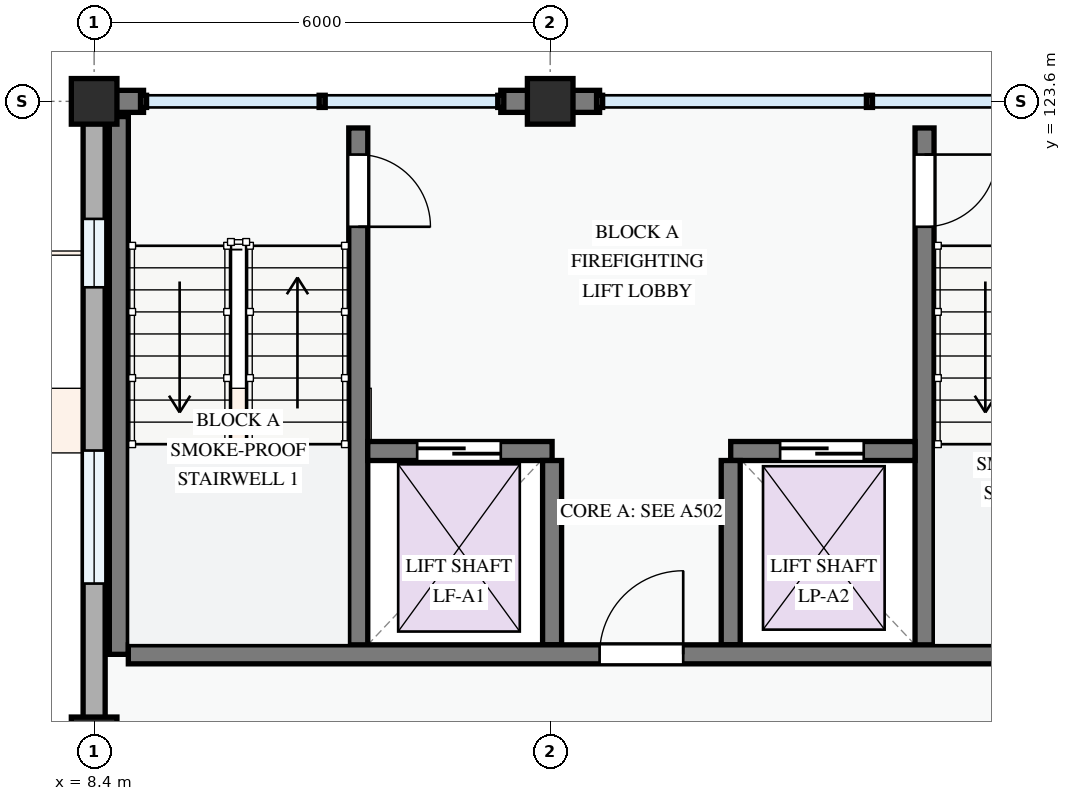
"""IFC4 building model, lengths in metres.
Left out: names, types, materials, properties, quantities, classifications, styles, units other than length and angle.
Written with IfcOpenShell. Run it as: python <this file> out.ifc"""

import sys

from ifc_helpers import new_model, si_unit, direction, frame, frame_2d, origin, origin_2d, place, context, subcontext, project, spatial, rectangle, extrude, element, fill, save


model = new_model("IFC4")
c1 = context("Model", 3, precision=1e-05, world=origin(), true_north=direction((0.0, 1.0)))
c2 = subcontext(c1, "Body", "Model", "MODEL_VIEW")
j1 = project(units=[si_unit("LENGTHUNIT", "METRE"), si_unit("PLANEANGLEUNIT", "RADIAN")], contexts=[c1])
p1 = place(None, origin())
s1 = spatial("IfcSite", under=j1, at=p1, CompositionType="ELEMENT")
p2 = place(p1, origin())
s2 = spatial("IfcBuilding", under=s1, at=p2, CompositionType="ELEMENT")
p3 = place(p2, frame((0.0, 0.0, 27.9)))
s3 = spatial("IfcBuildingStorey", under=s2, at=p3, CompositionType="ELEMENT", Elevation=27.9)
for number, where, z_axis, x_axis in (
    (1, (8.4, 115.2, 0.0), (0.0, 0.0, 1.0), (1.0, 0.0, 0.0)),
    (2, (8.4, 123.6, 0.0), (0.0, 0.0, 1.0), (1.0, 0.0, 0.0)),
    (3, (14.4, 123.6, 0.0), (0.0, 0.0, 1.0), (1.0, 0.0, 0.0)),
):
    element("IfcColumn", number, at=place(p3, frame(where, z_axis=z_axis, x_axis=x_axis)), inside=s3, PredefinedType="COLUMN", context=c2, shape_type="SweptSolid", body=[
        extrude(rectangle(XDim=0.6, YDim=0.6, at=origin_2d()), origin(), (0.0, 0.0, 1.0), 3.3),
    ])
p4 = place(p3, frame((15.05, 123.6, 0.0), z_axis=(0.0, 0.0, 1.0), x_axis=(-1.0, 0.0, 0.0)))
e4 = element("IfcWall", 4, at=p4, inside=s3, PredefinedType="STANDARD", context=c2, shape_type="SweptSolid", body=[
    extrude(rectangle(XDim=0.65, YDim=0.29, at=frame_2d((0.325, 0.0))), origin(), (0.0, 0.0, 1.0), 3.04),
])
p5 = place(p3, frame((14.4, 123.6, 0.0), z_axis=(0.0, 0.0, 1.0), x_axis=(-1.0, 0.0, 0.0)))
e5 = element("IfcWall", 5, at=p5, inside=s3, PredefinedType="STANDARD", context=c2, shape_type="SweptSolid", body=[
    extrude(rectangle(XDim=0.65, YDim=0.29, at=frame_2d((0.325, 0.0))), origin(), (0.0, 0.0, 1.0), 3.04),
])
p6 = place(p3, frame((9.05, 123.6, 0.0), z_axis=(0.0, 0.0, 1.0), x_axis=(-1.0, 0.0, 0.0)))
e6 = element("IfcWall", 6, at=p6, inside=s3, PredefinedType="STANDARD", context=c2, shape_type="SweptSolid", body=[
    extrude(rectangle(XDim=0.503, YDim=0.29, at=frame_2d((0.251, 0.0))), origin(), (0.0, 0.0, 1.0), 3.04),
])
p7 = place(p3, frame((8.4, 123.6, 0.0), z_axis=(0.0, 0.0, 1.0), x_axis=(0.0, -1.0, 0.0)))
e7 = element("IfcWall", 7, at=p7, inside=s3, PredefinedType="STANDARD", context=c2, shape_type="SweptSolid", body=[
    extrude(rectangle(XDim=8.4, YDim=0.29, at=frame_2d((4.2, 0.0))), origin(), (0.0, 0.0, 1.0), 2.345),
])
p8 = place(p7, frame((1.546, 0.0, 0.78)))
e8 = element("IfcOpeningElement", 8, at=p8, cuts=e7, PredefinedType="OPENING", context=c2, shape_type="SweptSolid", body=[
    extrude(rectangle(XDim=0.9, YDim=1.2, at=frame_2d((0.45, 0.6))), frame((0.0, 0.155, 0.0), z_axis=(0.0, -1.0, 0.0), x_axis=(1.0, 0.0, 0.0)), (0.0, 0.0, 1.0), 0.31),
])
p9 = place(p7, frame((4.594, 0.0, 0.78)))
e9 = element("IfcOpeningElement", 9, at=p9, cuts=e7, PredefinedType="OPENING", context=c2, shape_type="SweptSolid", body=[
    extrude(rectangle(XDim=1.75, YDim=1.45, at=frame_2d((0.875, 0.725))), frame((0.0, 0.155, 0.0), z_axis=(0.0, -1.0, 0.0), x_axis=(1.0, 0.0, 0.0)), (0.0, 0.0, 1.0), 0.31),
])
p10 = place(p3, frame((11.875, 123.25, 0.0), z_axis=(0.0, 0.0, 1.0), x_axis=(0.0, -1.0, 0.0)))
e10 = element("IfcWall", 10, at=p10, inside=s3, PredefinedType="SHEAR", context=c2, shape_type="SweptSolid", body=[
    extrude(rectangle(XDim=6.925, YDim=0.25, at=frame_2d((3.462, 0.0))), origin(), (0.0, 0.0, 1.0), 3.0),
])
p11 = place(p10, frame((0.35, 0.0, 0.0)))
e11 = element("IfcOpeningElement", 11, at=p11, cuts=e10, PredefinedType="OPENING", context=c2, shape_type="SweptSolid", body=[
    extrude(rectangle(XDim=0.95, YDim=2.1, at=frame_2d((0.475, 1.05))), frame((0.0, 0.135, 0.0), z_axis=(0.0, -1.0, 0.0), x_axis=(1.0, 0.0, 0.0)), (0.0, 0.0, 1.0), 0.27),
])
p12 = place(p3, frame((8.725, 123.4, 0.0), z_axis=(0.0, 0.0, 1.0), x_axis=(0.0, -1.0, 0.0)))
e12 = element("IfcWall", 12, at=p12, inside=s3, PredefinedType="SHEAR", context=c2, shape_type="SweptSolid", body=[
    extrude(rectangle(XDim=7.075, YDim=0.25, at=frame_2d((3.538, 0.0))), origin(), (0.0, 0.0, 1.0), 3.0),
])
p13 = place(p3, frame((19.325, 123.25, 0.0), z_axis=(0.0, 0.0, 1.0), x_axis=(0.0, -1.0, 0.0)))
e13 = element("IfcWall", 13, at=p13, inside=s3, PredefinedType="SHEAR", context=c2, shape_type="SweptSolid", body=[
    extrude(rectangle(XDim=6.925, YDim=0.25, at=frame_2d((3.462, 0.0))), origin(), (0.0, 0.0, 1.0), 3.0),
])
p14 = place(p13, frame((0.35, 0.0, 0.0)))
e14 = element("IfcOpeningElement", 14, at=p14, cuts=e13, PredefinedType="OPENING", context=c2, shape_type="SweptSolid", body=[
    extrude(rectangle(XDim=0.95, YDim=2.1, at=frame_2d((0.475, 1.05))), frame((0.0, 0.135, 0.0), z_axis=(0.0, -1.0, 0.0), x_axis=(1.0, 0.0, 0.0)), (0.0, 0.0, 1.0), 0.27),
])
p15 = place(p3, frame((12.0, 119.0, 0.0), z_axis=(0.0, 0.0, 1.0), x_axis=(1.0, 0.0, 0.0)))
e15 = element("IfcWall", 15, at=p15, inside=s3, PredefinedType="SHEAR", context=c2, shape_type="SweptSolid", body=[
    extrude(rectangle(XDim=2.425, YDim=0.25, at=frame_2d((1.212, 0.0))), origin(), (0.0, 0.0, 1.0), 3.0),
])
p16 = place(p15, frame((0.65, 0.0, 0.0)))
e16 = element("IfcOpeningElement", 16, at=p16, cuts=e15, PredefinedType="OPENING", context=c2, shape_type="SweptSolid", body=[
    extrude(rectangle(XDim=1.1, YDim=2.15, at=frame_2d((0.55, 1.075))), frame((0.0, 0.135, 0.0), z_axis=(0.0, -1.0, 0.0), x_axis=(1.0, 0.0, 0.0)), (0.0, 0.0, 1.0), 0.27),
])
p17 = place(p3, frame((16.775, 119.0, 0.0), z_axis=(0.0, 0.0, 1.0), x_axis=(1.0, 0.0, 0.0)))
e17 = element("IfcWall", 17, at=p17, inside=s3, PredefinedType="SHEAR", context=c2, shape_type="SweptSolid", body=[
    extrude(rectangle(XDim=2.425, YDim=0.25, at=frame_2d((1.212, 0.0))), origin(), (0.0, 0.0, 1.0), 3.0),
])
p18 = place(p17, frame((0.65, 0.0, 0.0)))
e18 = element("IfcOpeningElement", 18, at=p18, cuts=e17, PredefinedType="OPENING", context=c2, shape_type="SweptSolid", body=[
    extrude(rectangle(XDim=1.1, YDim=2.15, at=frame_2d((0.55, 1.075))), frame((0.0, 0.135, 0.0), z_axis=(0.0, -1.0, 0.0), x_axis=(1.0, 0.0, 0.0)), (0.0, 0.0, 1.0), 0.27),
])
for number, where, z_axis, x_axis in (
    (19, (14.425, 118.875, 0.0), (0.0, 0.0, 1.0), (0.0, -1.0, 0.0)),
    (20, (16.775, 118.875, 0.0), (0.0, 0.0, 1.0), (0.0, -1.0, 0.0)),
):
    element("IfcWall", number, at=place(p3, frame(where, z_axis=z_axis, x_axis=x_axis)), inside=s3, PredefinedType="SHEAR", context=c2, shape_type="SweptSolid", body=[
        extrude(rectangle(XDim=2.425, YDim=0.25, at=frame_2d((1.212, 0.0))), origin(), (0.0, 0.0, 1.0), 3.0),
    ])
p19 = place(p3, frame((8.85, 116.325, 0.0), z_axis=(0.0, 0.0, 1.0), x_axis=(1.0, 0.0, 0.0)))
e21 = element("IfcWall", 21, at=p19, inside=s3, PredefinedType="SHEAR", context=c2, shape_type="SweptSolid", body=[
    extrude(rectangle(XDim=13.5, YDim=0.25, at=frame_2d((6.75, 0.0))), origin(), (0.0, 0.0, 1.0), 3.0),
])
p20 = place(p19, frame((6.2, 0.0, 0.0)))
e22 = element("IfcOpeningElement", 22, at=p20, cuts=e21, PredefinedType="OPENING", context=c2, shape_type="SweptSolid", body=[
    extrude(rectangle(XDim=1.1, YDim=2.15, at=frame_2d((0.55, 1.075))), frame((0.0, 0.135, 0.0), z_axis=(0.0, -1.0, 0.0), x_axis=(1.0, 0.0, 0.0)), (0.0, 0.0, 1.0), 0.27),
])
p21 = place(p8, origin())
e23 = element("IfcWindow", 23, at=p21, inside=s3, PartitioningType="SINGLE_PANEL", PredefinedType="WINDOW", context=c2, shape_type="SweptSolid", body=[
    extrude(rectangle(XDim=0.9, YDim=1.2, at=frame_2d((0.45, 0.6))), frame((0.0, 0.03, 0.0), z_axis=(0.0, -1.0, 0.0), x_axis=(1.0, 0.0, 0.0)), (0.0, 0.0, 1.0), 0.06),
])
fill(e8, e23)
p22 = place(p9, origin())
e24 = element("IfcWindow", 24, at=p22, inside=s3, PartitioningType="DOUBLE_PANEL_VERTICAL", PredefinedType="WINDOW", context=c2, shape_type="SweptSolid", body=[
    extrude(rectangle(XDim=1.75, YDim=1.45, at=frame_2d((0.875, 0.725))), frame((0.0, 0.03, 0.0), z_axis=(0.0, -1.0, 0.0), x_axis=(1.0, 0.0, 0.0)), (0.0, 0.0, 1.0), 0.06),
])
fill(e9, e24)
p23 = place(p11, origin())
e25 = element("IfcDoor", 25, at=p23, inside=s3, OperationType="SINGLE_SWING_RIGHT", PredefinedType="DOOR", context=c2, shape_type="SweptSolid", body=[
    extrude(rectangle(XDim=0.95, YDim=2.1, at=frame_2d((0.475, 1.05))), frame((0.0, 0.025, 0.0), z_axis=(0.0, -1.0, 0.0), x_axis=(1.0, 0.0, 0.0)), (0.0, 0.0, 1.0), 0.05),
])
fill(e11, e25)
p24 = place(p14, origin())
e26 = element("IfcDoor", 26, at=p24, inside=s3, OperationType="SINGLE_SWING_LEFT", PredefinedType="DOOR", context=c2, shape_type="SweptSolid", body=[
    extrude(rectangle(XDim=0.95, YDim=2.1, at=frame_2d((0.475, 1.05))), frame((0.0, 0.025, 0.0), z_axis=(0.0, -1.0, 0.0), x_axis=(1.0, 0.0, 0.0)), (0.0, 0.0, 1.0), 0.05),
])
fill(e14, e26)
p25 = place(p16, origin())
e27 = element("IfcDoor", 27, at=p25, inside=s3, OperationType="SLIDING_TO_LEFT", PredefinedType="DOOR", context=c2, shape_type="SweptSolid", body=[
    extrude(rectangle(XDim=1.1, YDim=2.15, at=frame_2d((0.55, 1.075))), frame((0.0, 0.025, 0.0), z_axis=(0.0, -1.0, 0.0), x_axis=(1.0, 0.0, 0.0)), (0.0, 0.0, 1.0), 0.05),
])
fill(e16, e27)
p26 = place(p18, origin())
e28 = element("IfcDoor", 28, at=p26, inside=s3, OperationType="SLIDING_TO_LEFT", PredefinedType="DOOR", context=c2, shape_type="SweptSolid", body=[
    extrude(rectangle(XDim=1.1, YDim=2.15, at=frame_2d((0.55, 1.075))), frame((0.0, 0.025, 0.0), z_axis=(0.0, -1.0, 0.0), x_axis=(1.0, 0.0, 0.0)), (0.0, 0.0, 1.0), 0.05),
])
fill(e18, e28)
p27 = place(p20, origin())
e29 = element("IfcDoor", 29, at=p27, inside=s3, OperationType="SINGLE_SWING_RIGHT", PredefinedType="DOOR", context=c2, shape_type="SweptSolid", body=[
    extrude(rectangle(XDim=1.1, YDim=2.15, at=frame_2d((0.55, 1.075))), frame((0.0, 0.025, 0.0), z_axis=(0.0, -1.0, 0.0), x_axis=(1.0, 0.0, 0.0)), (0.0, 0.0, 1.0), 0.05),
])
fill(e22, e29)
save(model, sys.argv[1])
